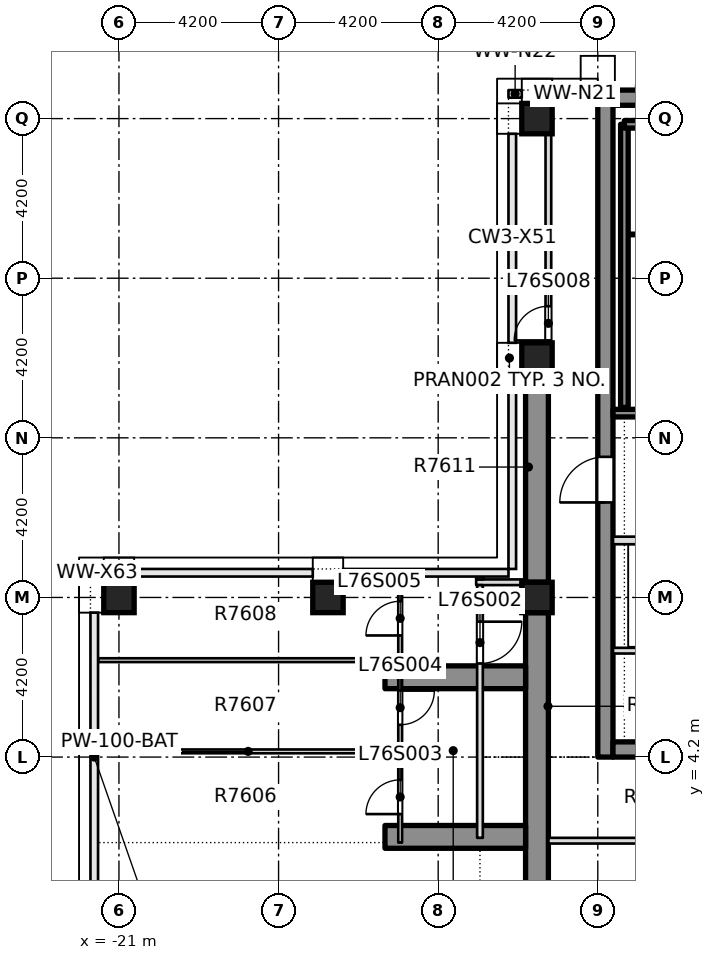
"""IFC4 building model, lengths in metres.
Left out: names, types, materials, properties, quantities, classifications, styles, units other than length and angle.
Written with IfcOpenShell. Run it as: python <this file> out.ifc"""

import sys

from ifc_helpers import new_model, si_unit, direction, frame, frame_2d, origin, origin_2d, place, context, subcontext, project, spatial, rectangle, extrude, element, fill, save


model = new_model("IFC4")
c1 = context("Model", 3, precision=1e-05, world=origin(), true_north=direction((0.0, 1.0)))
c2 = subcontext(c1, "Body", "Model", "MODEL_VIEW")
j1 = project(units=[si_unit("LENGTHUNIT", "METRE"), si_unit("PLANEANGLEUNIT", "RADIAN")], contexts=[c1])
p1 = place(None, origin())
s1 = spatial("IfcSite", under=j1, at=p1, CompositionType="ELEMENT")
p2 = place(p1, origin())
s2 = spatial("IfcBuilding", under=s1, at=p2, CompositionType="ELEMENT")
p3 = place(p2, frame((0.0, 0.0, 293.85)))
s3 = spatial("IfcBuildingStorey", under=s2, at=p3, CompositionType="ELEMENT", Elevation=293.85)
p4 = place(p3, frame((-8.2, 4.2, -0.5), z_axis=(0.0, 0.0, 1.0), x_axis=(0.0, 1.0, 0.0)))
e1 = element("IfcWall", 1, at=p4, inside=s3, PredefinedType="SHEAR", context=c2, shape_type="SweptSolid", body=[
    extrude(rectangle(XDim=17.55, YDim=0.4, at=frame_2d((8.775, 0.0))), origin(), (0.0, 0.0, 1.0), 4.5),
])
p5 = place(p4, frame((6.7, 0.0, 0.5)))
e2 = element("IfcOpeningElement", 2, at=p5, cuts=e1, PredefinedType="OPENING", context=c2, shape_type="SweptSolid", body=[
    extrude(rectangle(XDim=1.2, YDim=2.1, at=frame_2d((0.6, 1.05))), frame((0.0, 0.21, 0.0), z_axis=(0.0, -1.0, 0.0), x_axis=(1.0, 0.0, 0.0)), (0.0, 0.0, 1.0), 0.42),
])
for number, where, z_axis, x_axis in (
    (3, (-8.0, 4.4, -0.5), (0.0, 0.0, 1.0), (1.0, 0.0, 0.0)),
    (4, (-8.0, 21.55, -0.5), (0.0, 0.0, 1.0), (1.0, 0.0, 0.0)),
):
    element("IfcWall", number, at=place(p3, frame(where, z_axis=z_axis, x_axis=x_axis)), inside=s3, PredefinedType="SHEAR", context=c2, shape_type="SweptSolid", body=[
        extrude(rectangle(XDim=16.0, YDim=0.4, at=frame_2d((8.0, 0.0))), origin(), (0.0, 0.0, 1.0), 4.5),
    ])
for number, where, z_axis, x_axis in (
    (5, (-21.0, 8.4, -0.5), (0.0, 0.0, 1.0), (1.0, 0.0, 0.0)),
    (6, (-15.5, 8.4, -0.5), (0.0, 0.0, 1.0), (1.0, 0.0, 0.0)),
    (7, (-10.0, 8.4, -0.5), (0.0, 0.0, 1.0), (1.0, 0.0, 0.0)),
    (8, (-10.0, 14.7, -0.5), (0.0, 0.0, 1.0), (1.0, 0.0, 0.0)),
    (9, (-10.0, 21.0, -0.5), (0.0, 0.0, 1.0), (1.0, 0.0, 0.0)),
):
    element("IfcColumn", number, at=place(p3, frame(where, z_axis=z_axis, x_axis=x_axis)), inside=s3, PredefinedType="COLUMN", context=c2, shape_type="SweptSolid", body=[
        extrude(rectangle(XDim=0.8, YDim=0.8, at=origin_2d()), origin(), (0.0, 0.0, 1.0), 4.5),
    ])
p6 = place(p3, frame((-10.0, 0.4, 0.0), z_axis=(0.0, 0.0, 1.0), x_axis=(0.0, 1.0, 0.0)))
e10 = element("IfcWall", 10, at=p6, inside=s3, PredefinedType="SHEAR", context=c2, shape_type="SweptSolid", body=[
    extrude(rectangle(XDim=7.6, YDim=0.6, at=frame_2d((3.8, 0.0))), origin(), (0.0, 0.0, 1.0), 4.0),
])
p7 = place(p3, frame((-14.0, 6.3, 0.0), z_axis=(0.0, 0.0, 1.0), x_axis=(1.0, 0.0, 0.0)))
e11 = element("IfcWall", 11, at=p7, inside=s3, PredefinedType="SHEAR", context=c2, shape_type="SweptSolid", body=[
    extrude(rectangle(XDim=3.7, YDim=0.6, at=frame_2d((1.85, 0.0))), origin(), (0.0, 0.0, 1.0), 4.0),
])
p8 = place(p3, frame((-10.0, 8.8, 0.0), z_axis=(0.0, 0.0, 1.0), x_axis=(0.0, 1.0, 0.0)))
e12 = element("IfcWall", 12, at=p8, inside=s3, PredefinedType="SHEAR", context=c2, shape_type="SweptSolid", body=[
    extrude(rectangle(XDim=5.5, YDim=0.6, at=frame_2d((2.75, 0.0))), origin(), (0.0, 0.0, 1.0), 4.0),
])
p9 = place(p3, frame((-14.0, 2.1, 0.0), z_axis=(0.0, 0.0, 1.0), x_axis=(1.0, 0.0, 0.0)))
e13 = element("IfcWall", 13, at=p9, inside=s3, PredefinedType="SHEAR", context=c2, shape_type="SweptSolid", body=[
    extrude(rectangle(XDim=3.7, YDim=0.6, at=frame_2d((1.85, 0.0))), origin(), (0.0, 0.0, 1.0), 4.0),
])
p10 = place(p3, frame((-9.699, 2.0, 0.0), z_axis=(0.0, 0.0, 1.0), x_axis=(1.0, 0.0, 0.0)))
e14 = element("IfcWall", 14, at=p10, inside=s3, PredefinedType="PARTITIONING", context=c2, shape_type="SweptSolid", body=[
    extrude(rectangle(XDim=19.398, YDim=0.15, at=frame_2d((9.699, 0.0))), origin(), (0.0, 0.0, 1.0), 4.0),
])
p11 = place(p10, frame((8.949, 0.0, 0.0)))
e15 = element("IfcOpeningElement", 15, at=p11, cuts=e14, PredefinedType="OPENING", context=c2, shape_type="SweptSolid", body=[
    extrude(rectangle(XDim=1.5, YDim=2.1, at=frame_2d((0.75, 1.05))), frame((0.0, 0.085, 0.0), z_axis=(0.0, -1.0, 0.0), x_axis=(1.0, 0.0, 0.0)), (0.0, 0.0, 1.0), 0.17),
])
for number, where, z_axis, x_axis in (
    (16, (-21.55, 4.35, 0.0), (0.0, 0.0, 1.0), (1.0, 0.0, 0.0)),
    (17, (-21.55, 6.75, 0.0), (0.0, 0.0, 1.0), (1.0, 0.0, 0.0)),
):
    element("IfcWall", number, at=place(p3, frame(where, z_axis=z_axis, x_axis=x_axis)), inside=s3, PredefinedType="PARTITIONING", context=c2, shape_type="SweptSolid", body=[
        extrude(rectangle(XDim=7.9, YDim=0.1, at=frame_2d((3.95, 0.0))), origin(), (0.0, 0.0, 1.0), 4.0),
    ])
p12 = place(p3, frame((-11.6, 8.8, 0.0), z_axis=(0.0, 0.0, 1.0), x_axis=(1.0, 0.0, 0.0)))
e18 = element("IfcWall", 18, at=p12, inside=s3, PredefinedType="PARTITIONING", context=c2, shape_type="SweptSolid", body=[
    extrude(rectangle(XDim=1.299, YDim=0.15, at=frame_2d((0.649, 0.0))), origin(), (0.0, 0.0, 1.0), 4.0),
])
p13 = place(p3, frame((-11.5, 8.875, 0.0), z_axis=(0.0, 0.0, 1.0), x_axis=(0.0, 1.0, 0.0)))
e19 = element("IfcWall", 19, at=p13, inside=s3, PredefinedType="PARTITIONING", context=c2, shape_type="SweptSolid", body=[
    extrude(rectangle(XDim=0.075, YDim=0.2, at=frame_2d((0.038, 0.0))), origin(), (0.0, 0.0, 1.0), 4.0),
])
p14 = place(p3, frame((-9.7, 14.301, 0.0), z_axis=(0.0, 0.0, 1.0), x_axis=(0.0, 1.0, 0.0)))
e20 = element("IfcWall", 20, at=p14, inside=s3, PredefinedType="PARTITIONING", context=c2, shape_type="SweptSolid", body=[
    extrude(rectangle(XDim=7.249, YDim=0.15, at=frame_2d((3.625, 0.0))), origin(), (0.0, 0.0, 1.0), 4.0),
])
p15 = place(p14, frame((0.862, 0.0, 0.0)))
e21 = element("IfcOpeningElement", 21, at=p15, cuts=e20, PredefinedType="OPENING", context=c2, shape_type="SweptSolid", body=[
    extrude(rectangle(XDim=0.9, YDim=2.1, at=frame_2d((0.45, 1.05))), frame((0.0, 0.085, 0.0), z_axis=(0.0, -1.0, 0.0), x_axis=(1.0, 0.0, 0.0)), (0.0, 0.0, 1.0), 0.17),
])
p16 = place(p3, frame((-13.6, 1.95, 0.0), z_axis=(0.0, 0.0, 1.0), x_axis=(0.0, 1.0, 0.0)))
e22 = element("IfcWall", 22, at=p16, inside=s3, PredefinedType="PARTITIONING", context=c2, shape_type="SweptSolid", body=[
    extrude(rectangle(XDim=7.0, YDim=0.1, at=frame_2d((3.5, 0.0))), origin(), (0.0, 0.0, 1.0), 4.0),
])
p17 = place(p16, frame((0.75, 0.0, 0.0)))
e23 = element("IfcOpeningElement", 23, at=p17, cuts=e22, PredefinedType="OPENING", context=c2, shape_type="SweptSolid", body=[
    extrude(rectangle(XDim=0.9, YDim=2.1, at=frame_2d((0.45, 1.05))), frame((0.0, 0.06, 0.0), z_axis=(0.0, -1.0, 0.0), x_axis=(1.0, 0.0, 0.0)), (0.0, 0.0, 1.0), 0.12),
])
p18 = place(p16, frame((3.1, 0.0, 0.0)))
e24 = element("IfcOpeningElement", 24, at=p18, cuts=e22, PredefinedType="OPENING", context=c2, shape_type="SweptSolid", body=[
    extrude(rectangle(XDim=0.9, YDim=2.1, at=frame_2d((0.45, 1.05))), frame((0.0, 0.06, 0.0), z_axis=(0.0, -1.0, 0.0), x_axis=(1.0, 0.0, 0.0)), (0.0, 0.0, 1.0), 0.12),
])
p19 = place(p16, frame((5.45, 0.0, 0.0)))
e25 = element("IfcOpeningElement", 25, at=p19, cuts=e22, PredefinedType="OPENING", context=c2, shape_type="SweptSolid", body=[
    extrude(rectangle(XDim=0.9, YDim=2.1, at=frame_2d((0.45, 1.05))), frame((0.0, 0.06, 0.0), z_axis=(0.0, -1.0, 0.0), x_axis=(1.0, 0.0, 0.0)), (0.0, 0.0, 1.0), 0.12),
])
p20 = place(p3, frame((-11.5, 2.075, 0.0), z_axis=(0.0, 0.0, 1.0), x_axis=(0.0, 1.0, 0.0)))
e26 = element("IfcWall", 26, at=p20, inside=s3, PredefinedType="PARTITIONING", context=c2, shape_type="SweptSolid", body=[
    extrude(rectangle(XDim=6.65, YDim=0.15, at=frame_2d((3.325, 0.0))), origin(), (0.0, 0.0, 1.0), 4.0),
])
p21 = place(p20, frame((4.588, 0.0, 0.0)))
e27 = element("IfcOpeningElement", 27, at=p21, cuts=e26, PredefinedType="OPENING", context=c2, shape_type="SweptSolid", body=[
    extrude(rectangle(XDim=1.1, YDim=2.1, at=frame_2d((0.55, 1.05))), frame((0.0, 0.085, 0.0), z_axis=(0.0, -1.0, 0.0), x_axis=(1.0, 0.0, 0.0)), (0.0, 0.0, 1.0), 0.17),
])
p22 = place(p3, frame((-8.4, 21.65, 0.0), z_axis=(0.0, 0.0, 1.0), x_axis=(-1.0, 0.0, 0.0)))
e28 = element("IfcWall", 28, at=p22, inside=s3, PredefinedType="STANDARD", context=c2, shape_type="SweptSolid", body=[
    extrude(rectangle(XDim=1.2, YDim=0.2, at=frame_2d((0.6, 0.0))), origin(), (0.0, 0.0, 1.0), 4.0),
])
for number, where, z_axis, x_axis in (
    (29, (-10.4, 21.65, 0.0), (0.0, 0.0, 1.0), (-1.0, 0.0, 0.0)),
    (30, (-21.4, 9.05, 0.0), (0.0, 0.0, 1.0), (-1.0, 0.0, 0.0)),
):
    element("IfcWall", number, at=place(p3, frame(where, z_axis=z_axis, x_axis=x_axis)), inside=s3, PredefinedType="STANDARD", context=c2, shape_type="SweptSolid", body=[
        extrude(rectangle(XDim=0.35, YDim=0.2, at=frame_2d((0.175, 0.0))), origin(), (0.0, 0.0, 1.0), 4.0),
    ])
p23 = place(p3, frame((-7.999, 7.0, 0.0), z_axis=(0.0, 0.0, 1.0), x_axis=(1.0, 0.0, 0.0)))
e31 = element("IfcWall", 31, at=p23, inside=s3, PredefinedType="PARTITIONING", context=c2, shape_type="SweptSolid", body=[
    extrude(rectangle(XDim=15.998, YDim=0.15, at=frame_2d((7.999, 0.0))), origin(), (0.0, 0.0, 1.0), 4.0),
])
p24 = place(p23, frame((7.299, 0.0, 0.0)))
e32 = element("IfcOpeningElement", 32, at=p24, cuts=e31, PredefinedType="OPENING", context=c2, shape_type="SweptSolid", body=[
    extrude(rectangle(XDim=1.4, YDim=2.1, at=frame_2d((0.7, 1.05))), frame((0.0, 0.085, 0.0), z_axis=(0.0, -1.0, 0.0), x_axis=(1.0, 0.0, 0.0)), (0.0, 0.0, 1.0), 0.17),
])
p25 = place(p3, frame((-7.999, 9.9, 0.0), z_axis=(0.0, 0.0, 1.0), x_axis=(1.0, 0.0, 0.0)))
e33 = element("IfcWall", 33, at=p25, inside=s3, PredefinedType="PARTITIONING", context=c2, shape_type="SweptSolid", body=[
    extrude(rectangle(XDim=4.399, YDim=0.2, at=frame_2d((2.199, 0.0))), origin(), (0.0, 0.0, 1.0), 4.0),
])
p26 = place(p25, frame((1.049, 0.0, 0.0)))
e34 = element("IfcOpeningElement", 34, at=p26, cuts=e33, PredefinedType="OPENING", context=c2, shape_type="SweptSolid", body=[
    extrude(rectangle(XDim=1.1, YDim=2.1, at=frame_2d((0.55, 1.05))), frame((0.0, 0.11, 0.0), z_axis=(0.0, -1.0, 0.0), x_axis=(1.0, 0.0, 0.0)), (0.0, 0.0, 1.0), 0.22),
])
p27 = place(p3, frame((-7.999, 13.25, 0.0), z_axis=(0.0, 0.0, 1.0), x_axis=(1.0, 0.0, 0.0)))
e35 = element("IfcWall", 35, at=p27, inside=s3, PredefinedType="SOLIDWALL", context=c2, shape_type="SweptSolid", body=[
    extrude(rectangle(XDim=4.574, YDim=0.2, at=frame_2d((2.287, 0.0))), origin(), (0.0, 0.0, 1.0), 4.0),
])
p28 = place(p27, frame((1.549, 0.0, 0.0)))
e36 = element("IfcOpeningElement", 36, at=p28, cuts=e35, PredefinedType="OPENING", context=c2, shape_type="SweptSolid", body=[
    extrude(rectangle(XDim=1.2, YDim=2.1, at=frame_2d((0.6, 1.05))), frame((0.0, 0.11, 0.0), z_axis=(0.0, -1.0, 0.0), x_axis=(1.0, 0.0, 0.0)), (0.0, 0.0, 1.0), 0.22),
])
p29 = place(p3, frame((-7.7, 13.4, 0.0), z_axis=(0.0, 0.0, 1.0), x_axis=(0.0, 1.0, 0.0)))
e37 = element("IfcWall", 37, at=p29, inside=s3, PredefinedType="SOLIDWALL", context=c2, shape_type="SweptSolid", body=[
    extrude(rectangle(XDim=7.45, YDim=0.2, at=frame_2d((3.725, 0.0))), origin(), (0.0, 0.0, 1.0), 4.0),
])
p30 = place(p3, frame((-7.7, 20.85, 0.0), z_axis=(0.0, 0.0, 1.0), x_axis=(1.0, 0.0, 0.0)))
e38 = element("IfcWall", 38, at=p30, inside=s3, PredefinedType="SOLIDWALL", context=c2, shape_type="SweptSolid", body=[
    extrude(rectangle(XDim=3.55, YDim=0.2, at=frame_2d((1.775, 0.0))), origin(), (0.0, 0.0, 1.0), 4.0),
])
p31 = place(p21, origin())
e39 = element("IfcDoor", 39, at=p31, inside=s3, OperationType="SINGLE_SWING_LEFT", PredefinedType="DOOR", context=c2, shape_type="SweptSolid", body=[
    extrude(rectangle(XDim=1.1, YDim=2.1, at=frame_2d((0.55, 1.05))), frame((0.0, 0.025, 0.0), z_axis=(0.0, -1.0, 0.0), x_axis=(1.0, 0.0, 0.0)), (0.0, 0.0, 1.0), 0.05),
])
fill(e27, e39)
p32 = place(p17, origin())
e40 = element("IfcDoor", 40, at=p32, inside=s3, OperationType="SINGLE_SWING_LEFT", PredefinedType="DOOR", context=c2, shape_type="SweptSolid", body=[
    extrude(rectangle(XDim=0.9, YDim=2.1, at=frame_2d((0.45, 1.05))), frame((0.0, 0.025, 0.0), z_axis=(0.0, -1.0, 0.0), x_axis=(1.0, 0.0, 0.0)), (0.0, 0.0, 1.0), 0.05),
])
fill(e23, e40)
p33 = place(p18, origin())
e41 = element("IfcDoor", 41, at=p33, inside=s3, OperationType="SINGLE_SWING_LEFT", PredefinedType="DOOR", context=c2, shape_type="SweptSolid", body=[
    extrude(rectangle(XDim=0.9, YDim=2.1, at=frame_2d((0.45, 1.05))), frame((0.0, 0.025, 0.0), z_axis=(0.0, -1.0, 0.0), x_axis=(1.0, 0.0, 0.0)), (0.0, 0.0, 1.0), 0.05),
])
fill(e24, e41)
p34 = place(p19, origin())
e42 = element("IfcDoor", 42, at=p34, inside=s3, OperationType="SINGLE_SWING_RIGHT", PredefinedType="DOOR", context=c2, shape_type="SweptSolid", body=[
    extrude(rectangle(XDim=0.9, YDim=2.1, at=frame_2d((0.45, 1.05))), frame((0.0, 0.025, 0.0), z_axis=(0.0, -1.0, 0.0), x_axis=(1.0, 0.0, 0.0)), (0.0, 0.0, 1.0), 0.05),
])
fill(e25, e42)
p35 = place(p15, origin())
e43 = element("IfcDoor", 43, at=p35, inside=s3, OperationType="SINGLE_SWING_LEFT", PredefinedType="DOOR", context=c2, shape_type="SweptSolid", body=[
    extrude(rectangle(XDim=0.9, YDim=2.1, at=frame_2d((0.45, 1.05))), frame((0.0, 0.025, 0.0), z_axis=(0.0, -1.0, 0.0), x_axis=(1.0, 0.0, 0.0)), (0.0, 0.0, 1.0), 0.05),
])
fill(e21, e43)
p36 = place(p5, origin())
e44 = element("IfcDoor", 44, at=p36, inside=s3, OperationType="SINGLE_SWING_LEFT", PredefinedType="DOOR", context=c2, shape_type="SweptSolid", body=[
    extrude(rectangle(XDim=1.2, YDim=2.1, at=frame_2d((0.6, 1.05))), frame((0.0, 0.025, 0.0), z_axis=(0.0, -1.0, 0.0), x_axis=(1.0, 0.0, 0.0)), (0.0, 0.0, 1.0), 0.05),
])
fill(e2, e44)
save(model, sys.argv[1])
